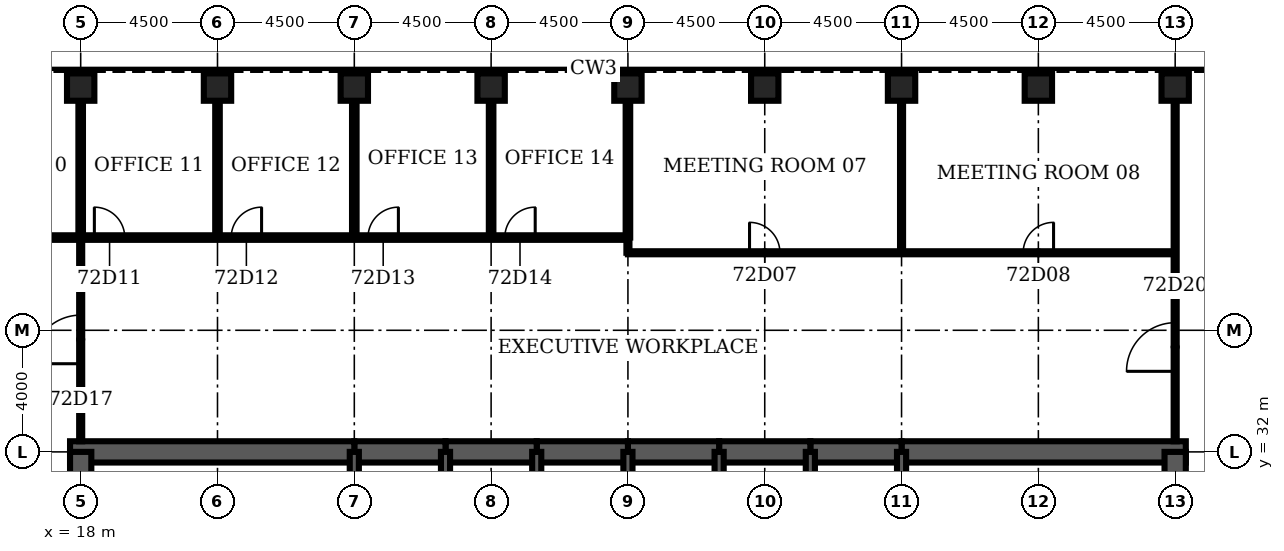
"""IFC4 building model, lengths in metres.
Left out: names, types, materials, properties, quantities, classifications, styles, units other than length and angle.
Written with IfcOpenShell. Run it as: python <this file> out.ifc"""

import sys

from ifc_helpers import new_model, si_unit, direction, frame, frame_2d, origin, origin_2d, place, context, subcontext, project, spatial, rectangle, hollow_rectangle, extrude, element, fill, save


model = new_model("IFC4")
c1 = context("Model", 3, precision=1e-05, world=origin(), true_north=direction((0.0, 1.0)))
c2 = subcontext(c1, "Body", "Model", "MODEL_VIEW")
j1 = project(units=[si_unit("LENGTHUNIT", "METRE"), si_unit("PLANEANGLEUNIT", "RADIAN")], contexts=[c1])
p1 = place(None, origin())
s1 = spatial("IfcSite", under=j1, at=p1, CompositionType="ELEMENT")
p2 = place(p1, origin())
s2 = spatial("IfcBuilding", under=s1, at=p2, CompositionType="ELEMENT")
p3 = place(p2, frame((0.0, 0.0, 317.3)))
s3 = spatial("IfcBuildingStorey", under=s2, at=p3, CompositionType="ELEMENT", Elevation=317.3)
for number, where, z_axis, x_axis in (
    (1, (54.0, 44.0, 0.0), (0.0, 0.0, 1.0), (0.0, 1.0, 0.0)),
    (2, (49.5, 44.0, 0.0), (0.0, 0.0, 1.0), (0.0, 1.0, 0.0)),
    (3, (45.0, 44.0, 0.0), (0.0, 0.0, 1.0), (0.0, 1.0, 0.0)),
    (4, (40.5, 44.0, 0.0), (0.0, 0.0, 1.0), (0.0, 1.0, 0.0)),
    (5, (36.0, 44.0, 0.0), (0.0, 0.0, 1.0), (0.0, 1.0, 0.0)),
    (6, (31.5, 44.0, 0.0), (0.0, 0.0, 1.0), (0.0, 1.0, 0.0)),
    (7, (27.0, 44.0, 0.0), (0.0, 0.0, 1.0), (0.0, 1.0, 0.0)),
    (8, (22.5, 44.0, 0.0), (0.0, 0.0, 1.0), (0.0, 1.0, 0.0)),
    (9, (18.0, 44.0, 0.0), (0.0, 0.0, 1.0), (0.0, 1.0, 0.0)),
):
    element("IfcColumn", number, at=place(p3, frame(where, z_axis=z_axis, x_axis=x_axis)), inside=s3, PredefinedType="COLUMN", context=c2, shape_type="SweptSolid", body=[
        extrude(hollow_rectangle(XDim=0.9, YDim=0.9, WallThickness=0.05, at=origin_2d()), origin(), (0.0, 0.0, 1.0), 4.2),
    ])
p4 = place(p3, frame((54.35, 32.0, 0.0), z_axis=(0.0, 0.0, 1.0), x_axis=(-1.0, 0.0, 0.0)))
e10 = element("IfcWall", 10, at=p4, inside=s3, PredefinedType="SHEAR", context=c2, shape_type="SweptSolid", body=[
    extrude(rectangle(XDim=9.35, YDim=0.7, at=frame_2d((4.675, 0.0))), origin(), (0.0, 0.0, 1.0), 4.2),
])
for number, where, z_axis, x_axis in (
    (11, (45.0, 32.0, 0.0), (0.0, 0.0, 1.0), (-1.0, 0.0, 0.0)),
    (12, (42.0, 32.0, 0.0), (0.0, 0.0, 1.0), (-1.0, 0.0, 0.0)),
    (13, (39.0, 32.0, 0.0), (0.0, 0.0, 1.0), (-1.0, 0.0, 0.0)),
    (14, (36.0, 32.0, 0.0), (0.0, 0.0, 1.0), (-1.0, 0.0, 0.0)),
    (15, (33.0, 32.0, 0.0), (0.0, 0.0, 1.0), (-1.0, 0.0, 0.0)),
    (16, (30.0, 32.0, 0.0), (0.0, 0.0, 1.0), (-1.0, 0.0, 0.0)),
):
    element("IfcWall", number, at=place(p3, frame(where, z_axis=z_axis, x_axis=x_axis)), inside=s3, PredefinedType="SHEAR", context=c2, shape_type="SweptSolid", body=[
        extrude(rectangle(XDim=3.0, YDim=0.7, at=frame_2d((1.5, 0.0))), origin(), (0.0, 0.0, 1.0), 4.2),
    ])
p5 = place(p3, frame((27.0, 32.0, 0.0), z_axis=(0.0, 0.0, 1.0), x_axis=(-1.0, 0.0, 0.0)))
e17 = element("IfcWall", 17, at=p5, inside=s3, PredefinedType="SHEAR", context=c2, shape_type="SweptSolid", body=[
    extrude(rectangle(XDim=9.35, YDim=0.7, at=frame_2d((4.675, 0.0))), origin(), (0.0, 0.0, 1.0), 4.2),
])
for number, where, z_axis, x_axis in (
    (18, (18.0, 32.0, 0.0), (0.0, 0.0, 1.0), (0.0, -1.0, 0.0)),
    (19, (54.0, 28.8, 0.0), (0.0, 0.0, 1.0), (0.0, 1.0, 0.0)),
):
    element("IfcWall", number, at=place(p3, frame(where, z_axis=z_axis, x_axis=x_axis)), inside=s3, PredefinedType="SHEAR", context=c2, shape_type="SweptSolid", body=[
        extrude(rectangle(XDim=3.2, YDim=0.7, at=frame_2d((1.6, 0.0))), origin(), (0.0, 0.0, 1.0), 4.2),
    ])
for number, where, z_axis, x_axis in (
    (20, (27.0, 28.8, 0.0), (0.0, 0.0, 1.0), (0.0, 1.0, 0.0)),
    (21, (30.0, 28.8, 0.0), (0.0, 0.0, 1.0), (0.0, 1.0, 0.0)),
    (22, (33.0, 28.8, 0.0), (0.0, 0.0, 1.0), (0.0, 1.0, 0.0)),
    (23, (36.0, 28.8, 0.0), (0.0, 0.0, 1.0), (0.0, 1.0, 0.0)),
    (24, (39.0, 28.8, 0.0), (0.0, 0.0, 1.0), (0.0, 1.0, 0.0)),
    (25, (42.0, 28.8, 0.0), (0.0, 0.0, 1.0), (0.0, 1.0, 0.0)),
    (26, (45.0, 28.8, 0.0), (0.0, 0.0, 1.0), (0.0, 1.0, 0.0)),
):
    element("IfcWall", number, at=place(p3, frame(where, z_axis=z_axis, x_axis=x_axis)), inside=s3, PredefinedType="SOLIDWALL", context=c2, shape_type="SweptSolid", body=[
        extrude(rectangle(XDim=3.2, YDim=0.3, at=frame_2d((1.6, 0.0))), origin(), (0.0, 0.0, 1.0), 4.2),
    ])
p6 = place(p3, frame((36.0, 38.55, 0.0), z_axis=(0.0, 0.0, 1.0), x_axis=(1.0, 0.0, 0.0)))
e27 = element("IfcWall", 27, at=p6, inside=s3, PredefinedType="PARTITIONING", context=c2, shape_type="SweptSolid", body=[
    extrude(rectangle(XDim=18.0, YDim=0.1, at=frame_2d((9.0, 0.0))), origin(), (0.0, 0.0, 1.0), 3.0),
])
p7 = place(p6, frame((4.0, 0.0, 0.0)))
e28 = element("IfcOpeningElement", 28, at=p7, cuts=e27, PredefinedType="OPENING", context=c2, shape_type="SweptSolid", body=[
    extrude(rectangle(XDim=1.0, YDim=2.1, at=frame_2d((0.5, 1.05))), frame((0.0, 0.06, 0.0), z_axis=(0.0, -1.0, 0.0), x_axis=(1.0, 0.0, 0.0)), (0.0, 0.0, 1.0), 0.12),
])
p8 = place(p6, frame((13.0, 0.0, 0.0)))
e29 = element("IfcOpeningElement", 29, at=p8, cuts=e27, PredefinedType="OPENING", context=c2, shape_type="SweptSolid", body=[
    extrude(rectangle(XDim=1.0, YDim=2.1, at=frame_2d((0.5, 1.05))), frame((0.0, 0.06, 0.0), z_axis=(0.0, -1.0, 0.0), x_axis=(1.0, 0.0, 0.0)), (0.0, 0.0, 1.0), 0.12),
])
p9 = place(p3, frame((9.0, 39.05, 0.0), z_axis=(0.0, 0.0, 1.0), x_axis=(1.0, 0.0, 0.0)))
e30 = element("IfcWall", 30, at=p9, inside=s3, PredefinedType="PARTITIONING", context=c2, shape_type="SweptSolid", body=[
    extrude(rectangle(XDim=27.0, YDim=0.15, at=frame_2d((13.5, 0.0))), origin(), (0.0, 0.0, 1.0), 3.0),
])
p10 = place(p9, frame((0.45, 0.0, 0.0)))
e31 = element("IfcOpeningElement", 31, at=p10, cuts=e30, PredefinedType="OPENING", context=c2, shape_type="SweptSolid", body=[
    extrude(rectangle(XDim=1.0, YDim=2.1, at=frame_2d((0.5, 1.05))), frame((0.0, 0.085, 0.0), z_axis=(0.0, -1.0, 0.0), x_axis=(1.0, 0.0, 0.0)), (0.0, 0.0, 1.0), 0.17),
])
p11 = place(p9, frame((4.95, 0.0, 0.0)))
e32 = element("IfcOpeningElement", 32, at=p11, cuts=e30, PredefinedType="OPENING", context=c2, shape_type="SweptSolid", body=[
    extrude(rectangle(XDim=1.0, YDim=2.1, at=frame_2d((0.5, 1.05))), frame((0.0, 0.085, 0.0), z_axis=(0.0, -1.0, 0.0), x_axis=(1.0, 0.0, 0.0)), (0.0, 0.0, 1.0), 0.17),
])
p12 = place(p9, frame((9.45, 0.0, 0.0)))
e33 = element("IfcOpeningElement", 33, at=p12, cuts=e30, PredefinedType="OPENING", context=c2, shape_type="SweptSolid", body=[
    extrude(rectangle(XDim=1.0, YDim=2.1, at=frame_2d((0.5, 1.05))), frame((0.0, 0.085, 0.0), z_axis=(0.0, -1.0, 0.0), x_axis=(1.0, 0.0, 0.0)), (0.0, 0.0, 1.0), 0.17),
])
p13 = place(p9, frame((13.95, 0.0, 0.0)))
e34 = element("IfcOpeningElement", 34, at=p13, cuts=e30, PredefinedType="OPENING", context=c2, shape_type="SweptSolid", body=[
    extrude(rectangle(XDim=1.0, YDim=2.1, at=frame_2d((0.5, 1.05))), frame((0.0, 0.085, 0.0), z_axis=(0.0, -1.0, 0.0), x_axis=(1.0, 0.0, 0.0)), (0.0, 0.0, 1.0), 0.17),
])
p14 = place(p9, frame((18.45, 0.0, 0.0)))
e35 = element("IfcOpeningElement", 35, at=p14, cuts=e30, PredefinedType="OPENING", context=c2, shape_type="SweptSolid", body=[
    extrude(rectangle(XDim=1.0, YDim=2.1, at=frame_2d((0.5, 1.05))), frame((0.0, 0.085, 0.0), z_axis=(0.0, -1.0, 0.0), x_axis=(1.0, 0.0, 0.0)), (0.0, 0.0, 1.0), 0.17),
])
p15 = place(p9, frame((22.95, 0.0, 0.0)))
e36 = element("IfcOpeningElement", 36, at=p15, cuts=e30, PredefinedType="OPENING", context=c2, shape_type="SweptSolid", body=[
    extrude(rectangle(XDim=1.0, YDim=2.1, at=frame_2d((0.5, 1.05))), frame((0.0, 0.085, 0.0), z_axis=(0.0, -1.0, 0.0), x_axis=(1.0, 0.0, 0.0)), (0.0, 0.0, 1.0), 0.17),
])
p16 = place(p3, frame((18.0, 32.35, 0.0), z_axis=(0.0, 0.0, 1.0), x_axis=(0.0, 1.0, 0.0)))
e37 = element("IfcWall", 37, at=p16, inside=s3, PredefinedType="PARTITIONING", context=c2, shape_type="SweptSolid", body=[
    extrude(rectangle(XDim=6.7, YDim=0.1, at=frame_2d((3.35, 0.0))), origin(), (0.0, 0.0, 1.0), 3.0),
])
p17 = place(p16, frame((2.55, 0.0, 0.0)))
e38 = element("IfcOpeningElement", 38, at=p17, cuts=e37, PredefinedType="OPENING", context=c2, shape_type="SweptSolid", body=[
    extrude(rectangle(XDim=1.6, YDim=2.1, at=frame_2d((0.8, 1.05))), frame((0.0, 0.06, 0.0), z_axis=(0.0, -1.0, 0.0), x_axis=(1.0, 0.0, 0.0)), (0.0, 0.0, 1.0), 0.12),
])
for number, where, z_axis, x_axis in (
    (39, (18.0, 39.05, 0.0), (0.0, 0.0, 1.0), (0.0, 1.0, 0.0)),
    (40, (22.5, 39.05, 0.0), (0.0, 0.0, 1.0), (0.0, 1.0, 0.0)),
    (41, (27.0, 39.05, 0.0), (0.0, 0.0, 1.0), (0.0, 1.0, 0.0)),
    (42, (31.5, 39.05, 0.0), (0.0, 0.0, 1.0), (0.0, 1.0, 0.0)),
):
    element("IfcWall", number, at=place(p3, frame(where, z_axis=z_axis, x_axis=x_axis)), inside=s3, PredefinedType="PARTITIONING", context=c2, shape_type="SweptSolid", body=[
        extrude(rectangle(XDim=4.5, YDim=0.15, at=frame_2d((2.25, 0.0))), origin(), (0.0, 0.0, 1.0), 3.0),
    ])
p18 = place(p3, frame((36.0, 38.55, 0.0), z_axis=(0.0, 0.0, 1.0), x_axis=(0.0, 1.0, 0.0)))
e43 = element("IfcWall", 43, at=p18, inside=s3, PredefinedType="PARTITIONING", context=c2, shape_type="SweptSolid", body=[
    extrude(rectangle(XDim=0.5, YDim=0.1, at=frame_2d((0.25, 0.0))), origin(), (0.0, 0.0, 1.0), 3.0),
])
p19 = place(p3, frame((36.0, 39.05, 0.0), z_axis=(0.0, 0.0, 1.0), x_axis=(0.0, 1.0, 0.0)))
e44 = element("IfcWall", 44, at=p19, inside=s3, PredefinedType="PARTITIONING", context=c2, shape_type="SweptSolid", body=[
    extrude(rectangle(XDim=4.5, YDim=0.15, at=frame_2d((2.25, 0.0))), origin(), (0.0, 0.0, 1.0), 3.0),
])
p20 = place(p3, frame((45.0, 38.55, 0.0), z_axis=(0.0, 0.0, 1.0), x_axis=(0.0, 1.0, 0.0)))
e45 = element("IfcWall", 45, at=p20, inside=s3, PredefinedType="PARTITIONING", context=c2, shape_type="SweptSolid", body=[
    extrude(rectangle(XDim=5.0, YDim=0.1, at=frame_2d((2.5, 0.0))), origin(), (0.0, 0.0, 1.0), 3.0),
])
p21 = place(p3, frame((54.0, 32.35, 0.0), z_axis=(0.0, 0.0, 1.0), x_axis=(0.0, 1.0, 0.0)))
e46 = element("IfcWall", 46, at=p21, inside=s3, PredefinedType="PARTITIONING", context=c2, shape_type="SweptSolid", body=[
    extrude(rectangle(XDim=11.2, YDim=0.1, at=frame_2d((5.6, 0.0))), origin(), (0.0, 0.0, 1.0), 3.0),
])
p22 = place(p21, frame((2.3, 0.0, 0.0)))
e47 = element("IfcOpeningElement", 47, at=p22, cuts=e46, PredefinedType="OPENING", context=c2, shape_type="SweptSolid", body=[
    extrude(rectangle(XDim=1.6, YDim=2.1, at=frame_2d((0.8, 1.05))), frame((0.0, 0.06, 0.0), z_axis=(0.0, -1.0, 0.0), x_axis=(1.0, 0.0, 0.0)), (0.0, 0.0, 1.0), 0.12),
])
p23 = place(p7, origin())
e48 = element("IfcDoor", 48, at=p23, inside=s3, OperationType="SINGLE_SWING_LEFT", PredefinedType="DOOR", context=c2, shape_type="SweptSolid", body=[
    extrude(rectangle(XDim=1.0, YDim=2.1, at=frame_2d((0.5, 1.05))), frame((0.0, 0.025, 0.0), z_axis=(0.0, -1.0, 0.0), x_axis=(1.0, 0.0, 0.0)), (0.0, 0.0, 1.0), 0.05),
])
fill(e28, e48)
p24 = place(p8, origin())
e49 = element("IfcDoor", 49, at=p24, inside=s3, OperationType="SINGLE_SWING_RIGHT", PredefinedType="DOOR", context=c2, shape_type="SweptSolid", body=[
    extrude(rectangle(XDim=1.0, YDim=2.1, at=frame_2d((0.5, 1.05))), frame((0.0, 0.025, 0.0), z_axis=(0.0, -1.0, 0.0), x_axis=(1.0, 0.0, 0.0)), (0.0, 0.0, 1.0), 0.05),
])
fill(e29, e49)
p25 = place(p12, origin())
e50 = element("IfcDoor", 50, at=p25, inside=s3, OperationType="SINGLE_SWING_LEFT", PredefinedType="DOOR", context=c2, shape_type="SweptSolid", body=[
    extrude(rectangle(XDim=1.0, YDim=2.1, at=frame_2d((0.5, 1.05))), frame((0.0, 0.025, 0.0), z_axis=(0.0, -1.0, 0.0), x_axis=(1.0, 0.0, 0.0)), (0.0, 0.0, 1.0), 0.05),
])
fill(e33, e50)
p26 = place(p13, origin())
e51 = element("IfcDoor", 51, at=p26, inside=s3, OperationType="SINGLE_SWING_RIGHT", PredefinedType="DOOR", context=c2, shape_type="SweptSolid", body=[
    extrude(rectangle(XDim=1.0, YDim=2.1, at=frame_2d((0.5, 1.05))), frame((0.0, 0.025, 0.0), z_axis=(0.0, -1.0, 0.0), x_axis=(1.0, 0.0, 0.0)), (0.0, 0.0, 1.0), 0.05),
])
fill(e34, e51)
p27 = place(p14, origin())
e52 = element("IfcDoor", 52, at=p27, inside=s3, OperationType="SINGLE_SWING_RIGHT", PredefinedType="DOOR", context=c2, shape_type="SweptSolid", body=[
    extrude(rectangle(XDim=1.0, YDim=2.1, at=frame_2d((0.5, 1.05))), frame((0.0, 0.025, 0.0), z_axis=(0.0, -1.0, 0.0), x_axis=(1.0, 0.0, 0.0)), (0.0, 0.0, 1.0), 0.05),
])
fill(e35, e52)
p28 = place(p15, origin())
e53 = element("IfcDoor", 53, at=p28, inside=s3, OperationType="SINGLE_SWING_RIGHT", PredefinedType="DOOR", context=c2, shape_type="SweptSolid", body=[
    extrude(rectangle(XDim=1.0, YDim=2.1, at=frame_2d((0.5, 1.05))), frame((0.0, 0.025, 0.0), z_axis=(0.0, -1.0, 0.0), x_axis=(1.0, 0.0, 0.0)), (0.0, 0.0, 1.0), 0.05),
])
fill(e36, e53)
p29 = place(p17, origin())
e54 = element("IfcDoor", 54, at=p29, inside=s3, OperationType="SINGLE_SWING_LEFT", PredefinedType="DOOR", context=c2, shape_type="SweptSolid", body=[
    extrude(rectangle(XDim=1.6, YDim=2.1, at=frame_2d((0.8, 1.05))), frame((0.0, 0.025, 0.0), z_axis=(0.0, -1.0, 0.0), x_axis=(1.0, 0.0, 0.0)), (0.0, 0.0, 1.0), 0.05),
])
fill(e38, e54)
p30 = place(p22, origin())
e55 = element("IfcDoor", 55, at=p30, inside=s3, OperationType="SINGLE_SWING_LEFT", PredefinedType="DOOR", context=c2, shape_type="SweptSolid", body=[
    extrude(rectangle(XDim=1.6, YDim=2.1, at=frame_2d((0.8, 1.05))), frame((0.0, 0.025, 0.0), z_axis=(0.0, -1.0, 0.0), x_axis=(1.0, 0.0, 0.0)), (0.0, 0.0, 1.0), 0.05),
])
fill(e47, e55)
save(model, sys.argv[1])
